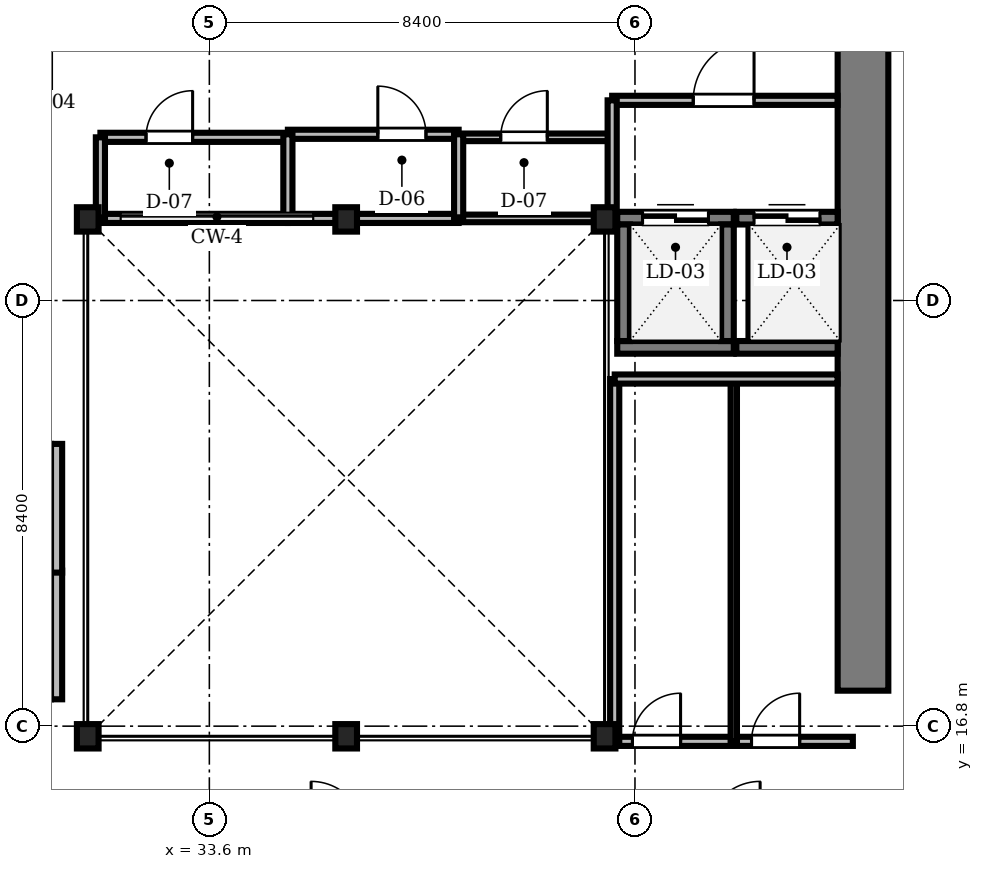
"""IFC4 building model, lengths in metres.
Left out: names, types, materials, properties, quantities, classifications, styles, units other than length and angle.
Written with IfcOpenShell. Run it as: python <this file> out.ifc"""

import sys

from ifc_helpers import new_model, si_unit, direction, frame, frame_2d, origin, origin_2d, place, context, subcontext, project, spatial, rectangle, i_section, extrude, source, transform, mapped, element, fill, save


model = new_model("IFC4")
c1 = context("Model", 3, precision=1e-05, world=origin(), true_north=direction((0.0, 1.0)))
c2 = subcontext(c1, "Body", "Model", "MODEL_VIEW")
j1 = project(units=[si_unit("LENGTHUNIT", "METRE"), si_unit("PLANEANGLEUNIT", "RADIAN")], contexts=[c1])
p1 = place(None, origin())
s1 = spatial("IfcSite", under=j1, at=p1, CompositionType="ELEMENT")
p2 = place(p1, origin())
s2 = spatial("IfcBuilding", under=s1, at=p2, CompositionType="ELEMENT")
p3 = place(p2, frame((0.0, 0.0, 34.9)))
s3 = spatial("IfcBuildingStorey", under=s2, at=p3, CompositionType="ELEMENT", Elevation=34.9)
m1 = source(origin(), c2, "Body", "SweptSolid", [
    extrude(rectangle(XDim=13.15, YDim=1.0, at=frame_2d((6.575, 0.0))), origin(), (0.0, 0.0, 1.0), 3.41),
])
p4 = place(p3, frame((46.5, 17.5, 0.0), z_axis=(0.0, 0.0, 1.0), x_axis=(0.0, 1.0, 0.0)))
e1 = element("IfcWall", 1, at=p4, inside=s3, PredefinedType="SHEAR", context=c2, shape_type="MappedRepresentation", body=[
    mapped(m1, transform((0.0, 0.0, 0.0), scale=1.0)),
])
m2 = source(origin(), c2, "Body", "SweptSolid", [
    extrude(i_section(OverallWidth=0.428, OverallDepth=0.481, WebThickness=0.04, FlangeThickness=0.063, FilletRadius=0.015, at=origin_2d()), origin(), (0.0, 0.0, 1.0), 3.41),
])
for number, where, z_axis, x_axis in (
    (2, (31.2, 16.6, 0.0), (0.0, 0.0, 1.0), (1.0, 0.0, 0.0)),
    (3, (36.3, 16.6, 0.0), (0.0, 0.0, 1.0), (1.0, 0.0, 0.0)),
    (4, (41.4, 16.6, 0.0), (0.0, 0.0, 1.0), (1.0, 0.0, 0.0)),
    (5, (41.4, 26.8, 0.0), (0.0, 0.0, 1.0), (1.0, 0.0, 0.0)),
    (6, (36.3, 26.8, 0.0), (0.0, 0.0, 1.0), (1.0, 0.0, 0.0)),
    (7, (31.2, 26.8, 0.0), (0.0, 0.0, 1.0), (1.0, 0.0, 0.0)),
):
    element("IfcColumn", number, at=place(p3, frame(where, z_axis=z_axis, x_axis=x_axis)), inside=s3, PredefinedType="COLUMN", context=c2, shape_type="MappedRepresentation", body=[
        mapped(m2, transform((0.0, 0.0, 0.0), scale=1.0)),
    ])
m3 = source(origin(), c2, "Body", "SweptSolid", [
    extrude(rectangle(XDim=2.54, YDim=0.22, at=frame_2d((1.27, 0.0))), origin(), (0.0, 0.0, 1.0), 3.41),
])
for number, where, z_axis, x_axis in (
    (8, (30.585, 17.33, 0.0), (0.0, 0.0, 1.0), (0.0, 1.0, 0.0)),
    (9, (30.585, 19.83, 0.0), (0.0, 0.0, 1.0), (0.0, 1.0, 0.0)),
):
    element("IfcWall", number, at=place(p3, frame(where, z_axis=z_axis, x_axis=x_axis)), inside=s3, PredefinedType="SOLIDWALL", context=c2, shape_type="MappedRepresentation", body=[
        mapped(m3, transform((0.0, 0.0, 0.0), scale=1.0)),
    ])
m4 = source(origin(), c2, "Body", "SweptSolid", [
    extrude(rectangle(XDim=2.3, YDim=0.25, at=frame_2d((1.15, 0.0))), origin(), (0.0, 0.0, 1.0), 3.41),
])
p5 = place(p3, frame((41.65, 24.275, 0.0), z_axis=(0.0, 0.0, 1.0), x_axis=(1.0, 0.0, 0.0)))
e10 = element("IfcWall", 10, at=p5, inside=s3, PredefinedType="SOLIDWALL", context=c2, shape_type="MappedRepresentation", body=[
    mapped(m4, transform((0.0, 0.0, 0.0), scale=1.0)),
])
p6 = place(p3, frame((41.65, 26.825, 0.0), z_axis=(0.0, 0.0, 1.0), x_axis=(1.0, 0.0, 0.0)))
e11 = element("IfcWall", 11, at=p6, inside=s3, PredefinedType="SOLIDWALL", context=c2, shape_type="MappedRepresentation", body=[
    mapped(m4, transform((0.0, 0.0, 0.0), scale=1.0)),
])
m5 = source(origin(), c2, "Body", "SweptSolid", [
    extrude(rectangle(XDim=1.3, YDim=2.3, at=frame_2d((0.65, 1.15))), frame((0.0, 0.135, 0.0), z_axis=(0.0, -1.0, 0.0), x_axis=(1.0, 0.0, 0.0)), (0.0, 0.0, 1.0), 0.27),
])
p7 = place(p6, frame((0.5, 0.0, 0.0)))
e12 = element("IfcOpeningElement", 12, at=p7, cuts=e11, PredefinedType="OPENING", context=c2, shape_type="MappedRepresentation", body=[
    mapped(m5, transform((0.0, 0.0, 0.0), scale=1.0)),
])
for number, where, z_axis, x_axis in (
    (13, (41.775, 24.4, 0.0), (0.0, 0.0, 1.0), (0.0, 1.0, 0.0)),
    (14, (43.825, 24.4, 0.0), (0.0, 0.0, 1.0), (0.0, 1.0, 0.0)),
):
    element("IfcWall", number, at=place(p3, frame(where, z_axis=z_axis, x_axis=x_axis)), inside=s3, PredefinedType="SOLIDWALL", context=c2, shape_type="MappedRepresentation", body=[
        mapped(m4, transform((0.0, 0.0, 0.0), scale=1.0)),
    ])
m6 = source(origin(), c2, "Body", "SweptSolid", [
    extrude(rectangle(XDim=2.0, YDim=0.25, at=frame_2d((1.0, 0.0))), origin(), (0.0, 0.0, 1.0), 3.41),
])
p8 = place(p3, frame((44.0, 24.275, 0.0), z_axis=(0.0, 0.0, 1.0), x_axis=(1.0, 0.0, 0.0)))
e15 = element("IfcWall", 15, at=p8, inside=s3, PredefinedType="SOLIDWALL", context=c2, shape_type="MappedRepresentation", body=[
    mapped(m6, transform((0.0, 0.0, 0.0), scale=1.0)),
])
p9 = place(p3, frame((44.0, 26.825, 0.0), z_axis=(0.0, 0.0, 1.0), x_axis=(1.0, 0.0, 0.0)))
e16 = element("IfcWall", 16, at=p9, inside=s3, PredefinedType="SOLIDWALL", context=c2, shape_type="MappedRepresentation", body=[
    mapped(m6, transform((0.0, 0.0, 0.0), scale=1.0)),
])
p10 = place(p9, frame((0.35, 0.0, 0.0)))
e17 = element("IfcOpeningElement", 17, at=p10, cuts=e16, PredefinedType="OPENING", context=c2, shape_type="MappedRepresentation", body=[
    mapped(m5, transform((0.0, 0.0, 0.0), scale=1.0)),
])
m7 = source(origin(), c2, "Body", "SweptSolid", [
    extrude(rectangle(XDim=4.448, YDim=0.18, at=frame_2d((2.224, 0.0))), origin(), (0.0, 0.0, 1.0), 3.042),
])
p11 = place(p3, frame((41.55, 29.15, 0.0), z_axis=(0.0, 0.0, 1.0), x_axis=(1.0, 0.0, 0.0)))
e18 = element("IfcWall", 18, at=p11, inside=s3, PredefinedType="PARTITIONING", context=c2, shape_type="MappedRepresentation", body=[
    mapped(m7, transform((0.0, 0.0, 0.0), scale=1.0)),
])
m8 = source(origin(), c2, "Body", "SweptSolid", [
    extrude(rectangle(XDim=1.2, YDim=2.2, at=frame_2d((0.6, 1.1))), frame((0.0, 0.1, 0.0), z_axis=(0.0, -1.0, 0.0), x_axis=(1.0, 0.0, 0.0)), (0.0, 0.0, 1.0), 0.2),
])
p12 = place(p11, frame((1.6, 0.0, 0.0)))
e19 = element("IfcOpeningElement", 19, at=p12, cuts=e18, PredefinedType="OPENING", context=c2, shape_type="MappedRepresentation", body=[
    mapped(m8, transform((0.0, 0.0, 0.0), scale=1.0)),
])
m9 = source(origin(), c2, "Body", "SweptSolid", [
    extrude(rectangle(XDim=4.7, YDim=0.18, at=frame_2d((2.35, 0.0))), origin(), (0.0, 0.0, 1.0), 2.802),
])
p13 = place(p3, frame((41.6, 16.5, 0.0), z_axis=(0.0, 0.0, 1.0), x_axis=(1.0, 0.0, 0.0)))
e20 = element("IfcWall", 20, at=p13, inside=s3, PredefinedType="PARTITIONING", context=c2, shape_type="MappedRepresentation", body=[
    mapped(m9, transform((0.0, 0.0, 0.0), scale=1.0)),
])
m10 = source(origin(), c2, "Body", "SweptSolid", [
    extrude(rectangle(XDim=0.95, YDim=2.15, at=frame_2d((0.475, 1.075))), frame((0.0, 0.1, 0.0), z_axis=(0.0, -1.0, 0.0), x_axis=(1.0, 0.0, 0.0)), (0.0, 0.0, 1.0), 0.2),
])
p14 = place(p13, frame((0.35, 0.0, 0.0)))
e21 = element("IfcOpeningElement", 21, at=p14, cuts=e20, PredefinedType="OPENING", context=c2, shape_type="MappedRepresentation", body=[
    mapped(m10, transform((0.0, 0.0, 0.0), scale=1.0)),
])
p15 = place(p13, frame((2.7, 0.0, 0.0)))
e22 = element("IfcOpeningElement", 22, at=p15, cuts=e20, PredefinedType="OPENING", context=c2, shape_type="MappedRepresentation", body=[
    mapped(m10, transform((0.0, 0.0, 0.0), scale=1.0)),
])
m11 = source(origin(), c2, "Body", "SweptSolid", [
    extrude(rectangle(XDim=3.7, YDim=0.18, at=frame_2d((1.85, 0.0))), origin(), (0.0, 0.0, 1.0), 3.042),
])
p16 = place(p3, frame((31.45, 28.42, 0.0), z_axis=(0.0, 0.0, 1.0), x_axis=(1.0, 0.0, 0.0)))
e23 = element("IfcWall", 23, at=p16, inside=s3, PredefinedType="PARTITIONING", context=c2, shape_type="MappedRepresentation", body=[
    mapped(m11, transform((0.0, 0.0, 0.0), scale=1.0)),
])
m12 = source(origin(), c2, "Body", "SweptSolid", [
    extrude(rectangle(XDim=0.92, YDim=2.1, at=frame_2d((0.46, 1.05))), frame((0.0, 0.1, 0.0), z_axis=(0.0, -1.0, 0.0), x_axis=(1.0, 0.0, 0.0)), (0.0, 0.0, 1.0), 0.2),
])
p17 = place(p16, frame((0.9, 0.0, 0.0)))
e24 = element("IfcOpeningElement", 24, at=p17, cuts=e23, PredefinedType="OPENING", context=c2, shape_type="MappedRepresentation", body=[
    mapped(m12, transform((0.0, 0.0, 0.0), scale=1.0)),
])
m13 = source(origin(), c2, "Body", "SweptSolid", [
    extrude(rectangle(XDim=3.37, YDim=0.18, at=frame_2d((1.685, 0.0))), origin(), (0.0, 0.0, 1.0), 3.41),
])
p18 = place(p3, frame((35.15, 28.48, 0.0), z_axis=(0.0, 0.0, 1.0), x_axis=(1.0, 0.0, 0.0)))
e25 = element("IfcWall", 25, at=p18, inside=s3, PredefinedType="PARTITIONING", context=c2, shape_type="MappedRepresentation", body=[
    mapped(m13, transform((0.0, 0.0, 0.0), scale=1.0)),
])
p19 = place(p18, frame((1.775, 0.0, 0.0)))
e26 = element("IfcOpeningElement", 26, at=p19, cuts=e25, PredefinedType="OPENING", context=c2, shape_type="MappedRepresentation", body=[
    mapped(m10, transform((0.0, 0.0, 0.0), scale=1.0)),
])
m14 = source(origin(), c2, "Body", "SweptSolid", [
    extrude(rectangle(XDim=3.0, YDim=0.15, at=frame_2d((1.5, 0.0))), origin(), (0.0, 0.0, 1.0), 3.41),
])
p20 = place(p3, frame((38.52, 28.42, 0.0), z_axis=(0.0, 0.0, 1.0), x_axis=(1.0, 0.0, 0.0)))
e27 = element("IfcWall", 27, at=p20, inside=s3, PredefinedType="PARTITIONING", context=c2, shape_type="MappedRepresentation", body=[
    mapped(m14, transform((0.0, 0.0, 0.0), scale=1.0)),
])
m15 = source(origin(), c2, "Body", "SweptSolid", [
    extrude(rectangle(XDim=0.92, YDim=2.1, at=frame_2d((0.46, 1.05))), frame((0.0, 0.085, 0.0), z_axis=(0.0, -1.0, 0.0), x_axis=(1.0, 0.0, 0.0)), (0.0, 0.0, 1.0), 0.17),
])
p21 = place(p20, frame((0.83, 0.0, 0.0)))
e28 = element("IfcOpeningElement", 28, at=p21, cuts=e27, PredefinedType="OPENING", context=c2, shape_type="MappedRepresentation", body=[
    mapped(m15, transform((0.0, 0.0, 0.0), scale=1.0)),
])
m16 = source(origin(), c2, "Body", "SweptSolid", [
    extrude(rectangle(XDim=7.15, YDim=0.18, at=frame_2d((3.575, 0.0))), origin(), (0.0, 0.0, 1.0), 2.802),
])
p22 = place(p3, frame((41.6, 16.5, 0.0), z_axis=(0.0, 0.0, 1.0), x_axis=(0.0, 1.0, 0.0)))
e29 = element("IfcWall", 29, at=p22, inside=s3, PredefinedType="PARTITIONING", context=c2, shape_type="MappedRepresentation", body=[
    mapped(m16, transform((0.0, 0.0, 0.0), scale=1.0)),
])
m17 = source(origin(), c2, "Body", "SweptSolid", [
    extrude(rectangle(XDim=7.15, YDim=0.125, at=frame_2d((3.575, 0.0))), origin(), (0.0, 0.0, 1.0), 2.802),
])
p23 = place(p3, frame((43.95, 16.5, 0.0), z_axis=(0.0, 0.0, 1.0), x_axis=(0.0, 1.0, 0.0)))
e30 = element("IfcWall", 30, at=p23, inside=s3, PredefinedType="PARTITIONING", context=c2, shape_type="MappedRepresentation", body=[
    mapped(m17, transform((0.0, 0.0, 0.0), scale=1.0)),
])
m18 = source(origin(), c2, "Body", "SweptSolid", [
    extrude(rectangle(XDim=4.398, YDim=0.18, at=frame_2d((2.199, 0.0))), origin(), (0.0, 0.0, 1.0), 3.41),
])
p24 = place(p3, frame((41.6, 23.65, 0.0), z_axis=(0.0, 0.0, 1.0), x_axis=(1.0, 0.0, 0.0)))
e31 = element("IfcWall", 31, at=p24, inside=s3, PredefinedType="PARTITIONING", context=c2, shape_type="MappedRepresentation", body=[
    mapped(m18, transform((0.0, 0.0, 0.0), scale=1.0)),
])
m19 = source(origin(), c2, "Body", "SweptSolid", [
    extrude(rectangle(XDim=3.7, YDim=0.18, at=frame_2d((1.85, 0.0))), origin(), (0.0, 0.0, 1.0), 2.952),
])
p25 = place(p3, frame((31.45, 26.82, 0.0), z_axis=(0.0, 0.0, 1.0), x_axis=(1.0, 0.0, 0.0)))
e32 = element("IfcWall", 32, at=p25, inside=s3, PredefinedType="PARTITIONING", context=c2, shape_type="MappedRepresentation", body=[
    mapped(m19, transform((0.0, 0.0, 0.0), scale=1.0)),
])
m20 = source(origin(), c2, "Body", "SweptSolid", [
    extrude(rectangle(XDim=3.37, YDim=0.18, at=frame_2d((1.685, 0.0))), origin(), (0.0, 0.0, 1.0), 2.952),
])
p26 = place(p3, frame((35.15, 26.82, 0.0), z_axis=(0.0, 0.0, 1.0), x_axis=(1.0, 0.0, 0.0)))
e33 = element("IfcWall", 33, at=p26, inside=s3, PredefinedType="PARTITIONING", context=c2, shape_type="MappedRepresentation", body=[
    mapped(m20, transform((0.0, 0.0, 0.0), scale=1.0)),
])
m21 = source(origin(), c2, "Body", "SweptSolid", [
    extrude(rectangle(XDim=3.0, YDim=0.15, at=frame_2d((1.5, 0.0))), origin(), (0.0, 0.0, 1.0), 2.802),
])
p27 = place(p3, frame((38.52, 26.82, 0.0), z_axis=(0.0, 0.0, 1.0), x_axis=(1.0, 0.0, 0.0)))
e34 = element("IfcWall", 34, at=p27, inside=s3, PredefinedType="PARTITIONING", context=c2, shape_type="MappedRepresentation", body=[
    mapped(m21, transform((0.0, 0.0, 0.0), scale=1.0)),
])
m22 = source(origin(), c2, "Body", "SweptSolid", [
    extrude(rectangle(XDim=2.35, YDim=0.18, at=frame_2d((1.175, 0.0))), origin(), (0.0, 0.0, 1.0), 2.802),
])
p28 = place(p3, frame((41.55, 26.8, 0.0), z_axis=(0.0, 0.0, 1.0), x_axis=(0.0, 1.0, 0.0)))
e35 = element("IfcWall", 35, at=p28, inside=s3, PredefinedType="PARTITIONING", context=c2, shape_type="MappedRepresentation", body=[
    mapped(m22, transform((0.0, 0.0, 0.0), scale=1.0)),
])
m23 = source(origin(), c2, "Body", "SweptSolid", [
    extrude(rectangle(XDim=1.66, YDim=0.18, at=frame_2d((0.83, 0.0))), origin(), (0.0, 0.0, 1.0), 2.952),
])
for number, where, z_axis, x_axis in (
    (36, (35.15, 26.82, 0.0), (0.0, 0.0, 1.0), (0.0, 1.0, 0.0)),
    (37, (38.52, 26.82, 0.0), (0.0, 0.0, 1.0), (0.0, 1.0, 0.0)),
):
    element("IfcWall", number, at=place(p3, frame(where, z_axis=z_axis, x_axis=x_axis)), inside=s3, PredefinedType="PARTITIONING", context=c2, shape_type="MappedRepresentation", body=[
        mapped(m23, transform((0.0, 0.0, 0.0), scale=1.0)),
    ])
m24 = source(origin(), c2, "Body", "SweptSolid", [
    extrude(rectangle(XDim=1.6, YDim=0.18, at=frame_2d((0.8, 0.0))), origin(), (0.0, 0.0, 1.0), 2.952),
])
p29 = place(p3, frame((31.45, 26.82, 0.0), z_axis=(0.0, 0.0, 1.0), x_axis=(0.0, 1.0, 0.0)))
e38 = element("IfcWall", 38, at=p29, inside=s3, PredefinedType="PARTITIONING", context=c2, shape_type="MappedRepresentation", body=[
    mapped(m24, transform((0.0, 0.0, 0.0), scale=1.0)),
])
m25 = source(origin(), c2, "Body", "SweptSolid", [
    extrude(rectangle(XDim=1.3, YDim=2.3, at=frame_2d((0.65, 1.15))), frame((0.0, 0.025, 0.0), z_axis=(0.0, -1.0, 0.0), x_axis=(1.0, 0.0, 0.0)), (0.0, 0.0, 1.0), 0.05),
])
p30 = place(p7, origin())
e39 = element("IfcDoor", 39, at=p30, inside=s3, OperationType="DOUBLE_DOOR_SLIDING", PredefinedType="DOOR", context=c2, shape_type="MappedRepresentation", body=[
    mapped(m25, transform((0.0, 0.0, 0.0), scale=1.0)),
])
fill(e12, e39)
p31 = place(p10, origin())
e40 = element("IfcDoor", 40, at=p31, inside=s3, OperationType="DOUBLE_DOOR_SLIDING", PredefinedType="DOOR", context=c2, shape_type="MappedRepresentation", body=[
    mapped(m25, transform((0.0, 0.0, 0.0), scale=1.0)),
])
fill(e17, e40)
m26 = source(origin(), c2, "Body", "SweptSolid", [
    extrude(rectangle(XDim=1.2, YDim=2.2, at=frame_2d((0.6, 1.1))), frame((0.0, 0.025, 0.0), z_axis=(0.0, -1.0, 0.0), x_axis=(1.0, 0.0, 0.0)), (0.0, 0.0, 1.0), 0.05),
])
p32 = place(p12, origin())
e41 = element("IfcDoor", 41, at=p32, inside=s3, OperationType="SINGLE_SWING_RIGHT", PredefinedType="DOOR", context=c2, shape_type="MappedRepresentation", body=[
    mapped(m26, transform((0.0, 0.0, 0.0), scale=1.0)),
])
fill(e19, e41)
m27 = source(origin(), c2, "Body", "SweptSolid", [
    extrude(rectangle(XDim=0.95, YDim=2.15, at=frame_2d((0.475, 1.075))), frame((0.0, 0.025, 0.0), z_axis=(0.0, -1.0, 0.0), x_axis=(1.0, 0.0, 0.0)), (0.0, 0.0, 1.0), 0.05),
])
p33 = place(p14, origin())
e42 = element("IfcDoor", 42, at=p33, inside=s3, OperationType="SINGLE_SWING_RIGHT", PredefinedType="DOOR", context=c2, shape_type="MappedRepresentation", body=[
    mapped(m27, transform((0.0, 0.0, 0.0), scale=1.0)),
])
fill(e21, e42)
p34 = place(p15, origin())
e43 = element("IfcDoor", 43, at=p34, inside=s3, OperationType="SINGLE_SWING_RIGHT", PredefinedType="DOOR", context=c2, shape_type="MappedRepresentation", body=[
    mapped(m27, transform((0.0, 0.0, 0.0), scale=1.0)),
])
fill(e22, e43)
m28 = source(origin(), c2, "Body", "SweptSolid", [
    extrude(rectangle(XDim=0.92, YDim=2.1, at=frame_2d((0.46, 1.05))), frame((0.0, 0.025, 0.0), z_axis=(0.0, -1.0, 0.0), x_axis=(1.0, 0.0, 0.0)), (0.0, 0.0, 1.0), 0.05),
])
p35 = place(p17, origin())
e44 = element("IfcDoor", 44, at=p35, inside=s3, OperationType="SINGLE_SWING_RIGHT", PredefinedType="DOOR", context=c2, shape_type="MappedRepresentation", body=[
    mapped(m28, transform((0.0, 0.0, 0.0), scale=1.0)),
])
fill(e24, e44)
p36 = place(p19, origin())
e45 = element("IfcDoor", 45, at=p36, inside=s3, OperationType="SINGLE_SWING_LEFT", PredefinedType="DOOR", context=c2, shape_type="MappedRepresentation", body=[
    mapped(m27, transform((0.0, 0.0, 0.0), scale=1.0)),
])
fill(e26, e45)
p37 = place(p21, origin())
e46 = element("IfcDoor", 46, at=p37, inside=s3, OperationType="SINGLE_SWING_RIGHT", PredefinedType="DOOR", context=c2, shape_type="MappedRepresentation", body=[
    mapped(m28, transform((0.0, 0.0, 0.0), scale=1.0)),
])
fill(e28, e46)
save(model, sys.argv[1])
